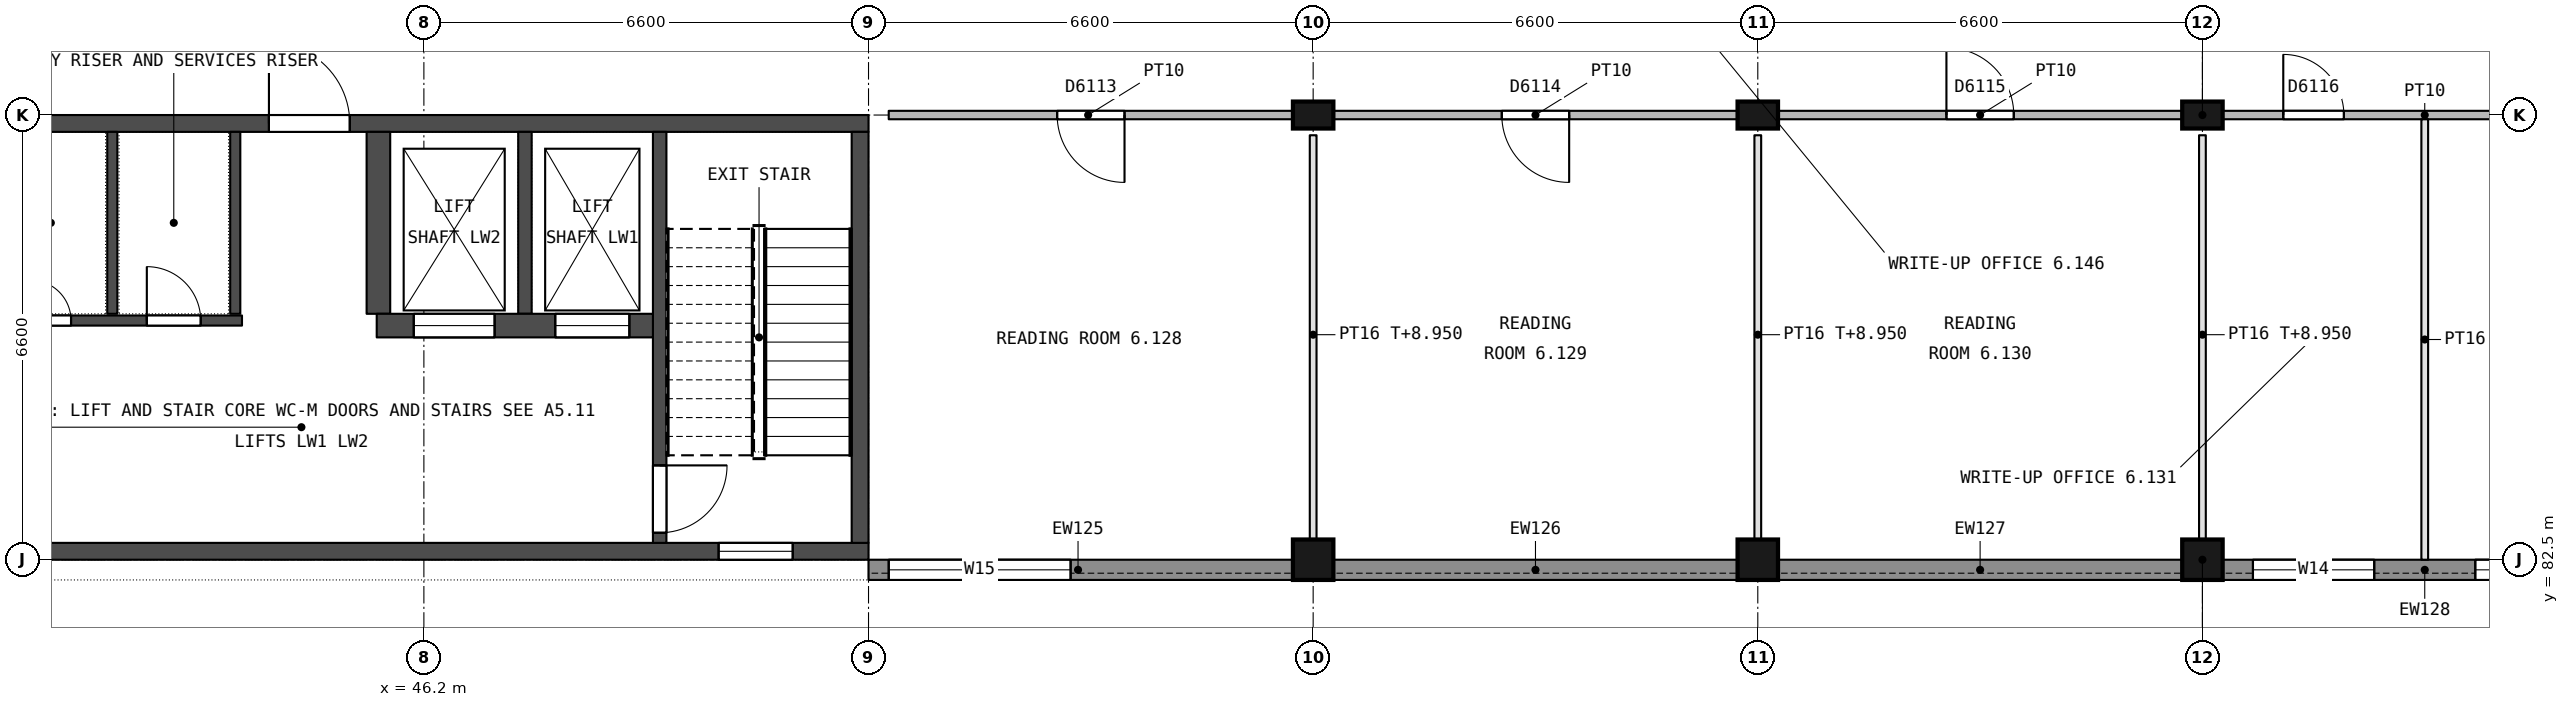
"""IFC4 building model, lengths in metres.
Left out: names, types, materials, properties, quantities, classifications, styles, units other than length and angle.
Written with IfcOpenShell. Run it as: python <this file> out.ifc"""

import sys

from ifc_helpers import new_model, si_unit, direction, frame, frame_2d, origin, origin_2d, place, context, subcontext, project, spatial, rectangle, extrude, element, fill, save


model = new_model("IFC4")
c1 = context("Model", 3, precision=1e-05, world=origin(), true_north=direction((0.0, 1.0)))
c2 = subcontext(c1, "Body", "Model", "MODEL_VIEW")
j1 = project(units=[si_unit("LENGTHUNIT", "METRE"), si_unit("PLANEANGLEUNIT", "RADIAN")], contexts=[c1])
p1 = place(None, origin())
s1 = spatial("IfcSite", under=j1, at=p1, CompositionType="ELEMENT")
p2 = place(p1, origin())
s2 = spatial("IfcBuilding", under=s1, at=p2, CompositionType="ELEMENT")
p3 = place(p2, frame((0.0, 0.0, 5.4)))
s3 = spatial("IfcBuildingStorey", under=s2, at=p3, CompositionType="ELEMENT", Elevation=5.4)
p4 = place(p3, frame((59.4, 82.5, 0.0), z_axis=(0.0, 0.0, 1.0), x_axis=(1.0, 0.0, 0.0)))
e1 = element("IfcColumn", 1, at=p4, inside=s3, PredefinedType="COLUMN", context=c2, shape_type="SweptSolid", body=[
    extrude(rectangle(XDim=0.6, YDim=0.6, at=origin_2d()), origin(), (0.0, 0.0, 1.0), 4.5),
])
p5 = place(p3, frame((59.4, 89.1, 0.0), z_axis=(0.0, 0.0, 1.0), x_axis=(1.0, 0.0, 0.0)))
e2 = element("IfcColumn", 2, at=p5, inside=s3, PredefinedType="COLUMN", context=c2, shape_type="SweptSolid", body=[
    extrude(rectangle(XDim=0.6, YDim=0.4, at=origin_2d()), origin(), (0.0, 0.0, 1.0), 4.5),
])
p6 = place(p3, frame((66.0, 82.5, 0.0), z_axis=(0.0, 0.0, 1.0), x_axis=(1.0, 0.0, 0.0)))
e3 = element("IfcColumn", 3, at=p6, inside=s3, PredefinedType="COLUMN", context=c2, shape_type="SweptSolid", body=[
    extrude(rectangle(XDim=0.6, YDim=0.6, at=origin_2d()), origin(), (0.0, 0.0, 1.0), 4.5),
])
p7 = place(p3, frame((66.0, 89.1, 0.0), z_axis=(0.0, 0.0, 1.0), x_axis=(1.0, 0.0, 0.0)))
e4 = element("IfcColumn", 4, at=p7, inside=s3, PredefinedType="COLUMN", context=c2, shape_type="SweptSolid", body=[
    extrude(rectangle(XDim=0.6, YDim=0.4, at=origin_2d()), origin(), (0.0, 0.0, 1.0), 4.5),
])
p8 = place(p3, frame((72.6, 82.5, 0.0), z_axis=(0.0, 0.0, 1.0), x_axis=(1.0, 0.0, 0.0)))
e5 = element("IfcColumn", 5, at=p8, inside=s3, PredefinedType="COLUMN", context=c2, shape_type="SweptSolid", body=[
    extrude(rectangle(XDim=0.6, YDim=0.6, at=origin_2d()), origin(), (0.0, 0.0, 1.0), 4.5),
])
p9 = place(p3, frame((72.6, 89.1, 0.0), z_axis=(0.0, 0.0, 1.0), x_axis=(1.0, 0.0, 0.0)))
e6 = element("IfcColumn", 6, at=p9, inside=s3, PredefinedType="COLUMN", context=c2, shape_type="SweptSolid", body=[
    extrude(rectangle(XDim=0.6, YDim=0.4, at=origin_2d()), origin(), (0.0, 0.0, 1.0), 4.5),
])
p10 = place(p3, frame((52.8, 88.975, 0.0), z_axis=(0.0, 0.0, 1.0), x_axis=(-1.0, 0.0, 0.0)))
e7 = element("IfcWall", 7, at=p10, inside=s3, PredefinedType="SHEAR", context=c2, shape_type="SweptSolid", body=[
    extrude(rectangle(XDim=13.2, YDim=0.25, at=frame_2d((6.6, 0.0))), origin(), (0.0, 0.0, 1.0), 4.25),
])
p11 = place(p10, frame((7.7, 0.0, 0.0)))
e8 = element("IfcOpeningElement", 8, at=p11, cuts=e7, PredefinedType="OPENING", context=c2, shape_type="SweptSolid", body=[
    extrude(rectangle(XDim=1.2, YDim=2.1, at=frame_2d((0.6, 1.05))), frame((0.0, 0.135, 0.0), z_axis=(0.0, -1.0, 0.0), x_axis=(1.0, 0.0, 0.0)), (0.0, 0.0, 1.0), 0.27),
])
p12 = place(p3, frame((52.8, 82.625, 0.0), z_axis=(0.0, 0.0, 1.0), x_axis=(-1.0, 0.0, 0.0)))
e9 = element("IfcWall", 9, at=p12, inside=s3, PredefinedType="SHEAR", context=c2, shape_type="SweptSolid", body=[
    extrude(rectangle(XDim=13.2, YDim=0.25, at=frame_2d((6.6, 0.0))), origin(), (0.0, 0.0, 1.0), 4.25),
])
p13 = place(p12, frame((1.125, 0.0, 0.7)))
e10 = element("IfcOpeningElement", 10, at=p13, cuts=e9, PredefinedType="OPENING", context=c2, shape_type="SweptSolid", body=[
    extrude(rectangle(XDim=1.1, YDim=1.5, at=frame_2d((0.55, 0.75))), frame((0.0, 0.135, 0.0), z_axis=(0.0, -1.0, 0.0), x_axis=(1.0, 0.0, 0.0)), (0.0, 0.0, 1.0), 0.27),
])
p14 = place(p3, frame((52.675, 88.85, 0.0), z_axis=(0.0, 0.0, 1.0), x_axis=(0.0, -1.0, 0.0)))
e11 = element("IfcWall", 11, at=p14, inside=s3, PredefinedType="SHEAR", context=c2, shape_type="SweptSolid", body=[
    extrude(rectangle(XDim=6.1, YDim=0.25, at=frame_2d((3.05, 0.0))), origin(), (0.0, 0.0, 1.0), 4.25),
])
p15 = place(p3, frame((49.7, 88.85, 0.0), z_axis=(0.0, 0.0, 1.0), x_axis=(0.0, -1.0, 0.0)))
e12 = element("IfcWall", 12, at=p15, inside=s3, PredefinedType="SHEAR", context=c2, shape_type="SweptSolid", body=[
    extrude(rectangle(XDim=6.1, YDim=0.2, at=frame_2d((3.05, 0.0))), origin(), (0.0, 0.0, 1.0), 4.25),
])
p16 = place(p15, frame((4.95, 0.0, 0.0)))
e13 = element("IfcOpeningElement", 13, at=p16, cuts=e12, PredefinedType="OPENING", context=c2, shape_type="SweptSolid", body=[
    extrude(rectangle(XDim=1.0, YDim=2.2, at=frame_2d((0.5, 1.1))), frame((0.0, 0.11, 0.0), z_axis=(0.0, -1.0, 0.0), x_axis=(1.0, 0.0, 0.0)), (0.0, 0.0, 1.0), 0.22),
])
p17 = place(p3, frame((47.7, 88.85, 0.0), z_axis=(0.0, 0.0, 1.0), x_axis=(0.0, -1.0, 0.0)))
e14 = element("IfcWall", 14, at=p17, inside=s3, PredefinedType="SHEAR", context=c2, shape_type="SweptSolid", body=[
    extrude(rectangle(XDim=2.7, YDim=0.2, at=frame_2d((1.35, 0.0))), origin(), (0.0, 0.0, 1.0), 4.25),
])
p18 = place(p3, frame((45.525, 88.85, 0.0), z_axis=(0.0, 0.0, 1.0), x_axis=(0.0, -1.0, 0.0)))
e15 = element("IfcWall", 15, at=p18, inside=s3, PredefinedType="SHEAR", context=c2, shape_type="SweptSolid", body=[
    extrude(rectangle(XDim=2.7, YDim=0.35, at=frame_2d((1.35, 0.0))), origin(), (0.0, 0.0, 1.0), 4.25),
])
p19 = place(p3, frame((49.6, 85.975, 0.0), z_axis=(0.0, 0.0, 1.0), x_axis=(-1.0, 0.0, 0.0)))
e16 = element("IfcWall", 16, at=p19, inside=s3, PredefinedType="SHEAR", context=c2, shape_type="SweptSolid", body=[
    extrude(rectangle(XDim=4.1, YDim=0.35, at=frame_2d((2.05, 0.0))), origin(), (0.0, 0.0, 1.0), 4.25),
])
p20 = place(p19, frame((0.35, 0.0, 0.0)))
e17 = element("IfcOpeningElement", 17, at=p20, cuts=e16, PredefinedType="OPENING", context=c2, shape_type="SweptSolid", body=[
    extrude(rectangle(XDim=1.1, YDim=2.2, at=frame_2d((0.55, 1.1))), frame((0.0, 0.185, 0.0), z_axis=(0.0, -1.0, 0.0), x_axis=(1.0, 0.0, 0.0)), (0.0, 0.0, 1.0), 0.37),
])
p21 = place(p19, frame((2.35, 0.0, 0.0)))
e18 = element("IfcOpeningElement", 18, at=p21, cuts=e16, PredefinedType="OPENING", context=c2, shape_type="SweptSolid", body=[
    extrude(rectangle(XDim=1.2, YDim=2.3, at=frame_2d((0.6, 1.15))), frame((0.0, 0.185, 0.0), z_axis=(0.0, -1.0, 0.0), x_axis=(1.0, 0.0, 0.0)), (0.0, 0.0, 1.0), 0.37),
])
p22 = place(p3, frame((43.4, 88.85, 0.0), z_axis=(0.0, 0.0, 1.0), x_axis=(0.0, -1.0, 0.0)))
e19 = element("IfcWall", 19, at=p22, inside=s3, PredefinedType="SHEAR", context=c2, shape_type="SweptSolid", body=[
    extrude(rectangle(XDim=2.7, YDim=0.15, at=frame_2d((1.35, 0.0))), origin(), (0.0, 0.0, 1.0), 4.25),
])
p23 = place(p3, frame((43.5, 86.05, 0.0), z_axis=(0.0, 0.0, 1.0), x_axis=(-1.0, 0.0, 0.0)))
e20 = element("IfcWall", 20, at=p23, inside=s3, PredefinedType="SHEAR", context=c2, shape_type="SweptSolid", body=[
    extrude(rectangle(XDim=3.65, YDim=0.15, at=frame_2d((1.825, 0.0))), origin(), (0.0, 0.0, 1.0), 4.25),
])
p24 = place(p23, frame((0.613, 0.0, 0.0)))
e21 = element("IfcOpeningElement", 21, at=p24, cuts=e20, PredefinedType="OPENING", context=c2, shape_type="SweptSolid", body=[
    extrude(rectangle(XDim=0.8, YDim=2.0, at=frame_2d((0.4, 1.0))), frame((0.0, 0.085, 0.0), z_axis=(0.0, -1.0, 0.0), x_axis=(1.0, 0.0, 0.0)), (0.0, 0.0, 1.0), 0.17),
])
p25 = place(p23, frame((2.538, 0.0, 0.0)))
e22 = element("IfcOpeningElement", 22, at=p25, cuts=e20, PredefinedType="OPENING", context=c2, shape_type="SweptSolid", body=[
    extrude(rectangle(XDim=0.6, YDim=2.1, at=frame_2d((0.3, 1.05))), frame((0.0, 0.085, 0.0), z_axis=(0.0, -1.0, 0.0), x_axis=(1.0, 0.0, 0.0)), (0.0, 0.0, 1.0), 0.17),
])
p26 = place(p3, frame((41.575, 88.85, 0.0), z_axis=(0.0, 0.0, 1.0), x_axis=(0.0, -1.0, 0.0)))
e23 = element("IfcWall", 23, at=p26, inside=s3, PredefinedType="SHEAR", context=c2, shape_type="SweptSolid", body=[
    extrude(rectangle(XDim=2.7, YDim=0.15, at=frame_2d((1.35, 0.0))), origin(), (0.0, 0.0, 1.0), 4.25),
])
p27 = place(p3, frame((59.1, 82.35, 0.0), z_axis=(0.0, 0.0, 1.0), x_axis=(-1.0, 0.0, 0.0)))
e24 = element("IfcWall", 24, at=p27, inside=s3, PredefinedType="STANDARD", context=c2, shape_type="SweptSolid", body=[
    extrude(rectangle(XDim=6.3, YDim=0.3, at=frame_2d((3.15, 0.0))), origin(), (0.0, 0.0, 1.0), 3.65),
])
p28 = place(p27, frame((3.3, 0.0, 0.6)))
e25 = element("IfcOpeningElement", 25, at=p28, cuts=e24, PredefinedType="OPENING", context=c2, shape_type="SweptSolid", body=[
    extrude(rectangle(XDim=2.7, YDim=2.1, at=frame_2d((1.35, 1.05))), frame((0.0, 0.16, 0.0), z_axis=(0.0, -1.0, 0.0), x_axis=(1.0, 0.0, 0.0)), (0.0, 0.0, 1.0), 0.32),
])
for number, where, z_axis, x_axis in (
    (26, (65.7, 82.35, 0.0), (0.0, 0.0, 1.0), (-1.0, 0.0, 0.0)),
    (27, (72.3, 82.35, 0.0), (0.0, 0.0, 1.0), (-1.0, 0.0, 0.0)),
):
    element("IfcWall", number, at=place(p3, frame(where, z_axis=z_axis, x_axis=x_axis)), inside=s3, PredefinedType="STANDARD", context=c2, shape_type="SweptSolid", body=[
        extrude(rectangle(XDim=6.0, YDim=0.3, at=frame_2d((3.0, 0.0))), origin(), (0.0, 0.0, 1.0), 3.65),
    ])
p29 = place(p3, frame((78.9, 82.35, 0.0), z_axis=(0.0, 0.0, 1.0), x_axis=(-1.0, 0.0, 0.0)))
e28 = element("IfcWall", 28, at=p29, inside=s3, PredefinedType="STANDARD", context=c2, shape_type="SweptSolid", body=[
    extrude(rectangle(XDim=6.0, YDim=0.3, at=frame_2d((3.0, 0.0))), origin(), (0.0, 0.0, 1.0), 3.65),
])
p30 = place(p29, frame((3.75, 0.0, 0.9)))
e29 = element("IfcOpeningElement", 29, at=p30, cuts=e28, PredefinedType="OPENING", context=c2, shape_type="SweptSolid", body=[
    extrude(rectangle(XDim=1.8, YDim=1.5, at=frame_2d((0.9, 0.75))), frame((0.0, 0.16, 0.0), z_axis=(0.0, -1.0, 0.0), x_axis=(1.0, 0.0, 0.0)), (0.0, 0.0, 1.0), 0.32),
])
p31 = place(p29, frame((0.45, 0.0, 0.9)))
e30 = element("IfcOpeningElement", 30, at=p31, cuts=e28, PredefinedType="OPENING", context=c2, shape_type="SweptSolid", body=[
    extrude(rectangle(XDim=1.8, YDim=1.5, at=frame_2d((0.9, 0.75))), frame((0.0, 0.16, 0.0), z_axis=(0.0, -1.0, 0.0), x_axis=(1.0, 0.0, 0.0)), (0.0, 0.0, 1.0), 0.32),
])
p32 = place(p3, frame((59.1, 89.1, 0.0), z_axis=(0.0, 0.0, 1.0), x_axis=(-1.0, 0.0, 0.0)))
e31 = element("IfcWall", 31, at=p32, inside=s3, PredefinedType="PARTITIONING", context=c2, shape_type="SweptSolid", body=[
    extrude(rectangle(XDim=6.0, YDim=0.125, at=frame_2d((3.0, 0.0))), origin(), (0.0, 0.0, 1.0), 3.65),
])
p33 = place(p32, frame((2.5, 0.0, 0.0)))
e32 = element("IfcOpeningElement", 32, at=p33, cuts=e31, PredefinedType="OPENING", context=c2, shape_type="SweptSolid", body=[
    extrude(rectangle(XDim=1.0, YDim=2.1, at=frame_2d((0.5, 1.05))), frame((0.0, 0.073, 0.0), z_axis=(0.0, -1.0, 0.0), x_axis=(1.0, 0.0, 0.0)), (0.0, 0.0, 1.0), 0.145),
])
p34 = place(p3, frame((65.7, 89.1, 0.0), z_axis=(0.0, 0.0, 1.0), x_axis=(-1.0, 0.0, 0.0)))
e33 = element("IfcWall", 33, at=p34, inside=s3, PredefinedType="PARTITIONING", context=c2, shape_type="SweptSolid", body=[
    extrude(rectangle(XDim=6.0, YDim=0.125, at=frame_2d((3.0, 0.0))), origin(), (0.0, 0.0, 1.0), 3.65),
])
p35 = place(p34, frame((2.5, 0.0, 0.0)))
e34 = element("IfcOpeningElement", 34, at=p35, cuts=e33, PredefinedType="OPENING", context=c2, shape_type="SweptSolid", body=[
    extrude(rectangle(XDim=1.0, YDim=2.1, at=frame_2d((0.5, 1.05))), frame((0.0, 0.073, 0.0), z_axis=(0.0, -1.0, 0.0), x_axis=(1.0, 0.0, 0.0)), (0.0, 0.0, 1.0), 0.145),
])
p36 = place(p3, frame((72.3, 89.1, 0.0), z_axis=(0.0, 0.0, 1.0), x_axis=(-1.0, 0.0, 0.0)))
e35 = element("IfcWall", 35, at=p36, inside=s3, PredefinedType="PARTITIONING", context=c2, shape_type="SweptSolid", body=[
    extrude(rectangle(XDim=6.0, YDim=0.125, at=frame_2d((3.0, 0.0))), origin(), (0.0, 0.0, 1.0), 3.65),
])
p37 = place(p36, frame((2.5, 0.0, 0.0)))
e36 = element("IfcOpeningElement", 36, at=p37, cuts=e35, PredefinedType="OPENING", context=c2, shape_type="SweptSolid", body=[
    extrude(rectangle(XDim=1.0, YDim=2.1, at=frame_2d((0.5, 1.05))), frame((0.0, 0.073, 0.0), z_axis=(0.0, -1.0, 0.0), x_axis=(1.0, 0.0, 0.0)), (0.0, 0.0, 1.0), 0.145),
])
p38 = place(p3, frame((78.9, 89.1, 0.0), z_axis=(0.0, 0.0, 1.0), x_axis=(-1.0, 0.0, 0.0)))
e37 = element("IfcWall", 37, at=p38, inside=s3, PredefinedType="PARTITIONING", context=c2, shape_type="SweptSolid", body=[
    extrude(rectangle(XDim=6.0, YDim=0.125, at=frame_2d((3.0, 0.0))), origin(), (0.0, 0.0, 1.0), 3.65),
])
p39 = place(p38, frame((4.2, 0.0, 0.0)))
e38 = element("IfcOpeningElement", 38, at=p39, cuts=e37, PredefinedType="OPENING", context=c2, shape_type="SweptSolid", body=[
    extrude(rectangle(XDim=0.9, YDim=2.1, at=frame_2d((0.45, 1.05))), frame((0.0, 0.073, 0.0), z_axis=(0.0, -1.0, 0.0), x_axis=(1.0, 0.0, 0.0)), (0.0, 0.0, 1.0), 0.145),
])
p40 = place(p38, frame((0.9, 0.0, 0.0)))
e39 = element("IfcOpeningElement", 39, at=p40, cuts=e37, PredefinedType="OPENING", context=c2, shape_type="SweptSolid", body=[
    extrude(rectangle(XDim=0.9, YDim=2.1, at=frame_2d((0.45, 1.05))), frame((0.0, 0.073, 0.0), z_axis=(0.0, -1.0, 0.0), x_axis=(1.0, 0.0, 0.0)), (0.0, 0.0, 1.0), 0.145),
])
for number, where, z_axis, x_axis in (
    (40, (59.4, 82.8, 0.0), (0.0, 0.0, 1.0), (0.0, 1.0, 0.0)),
    (41, (66.0, 82.8, 0.0), (0.0, 0.0, 1.0), (0.0, 1.0, 0.0)),
    (42, (72.6, 82.8, 0.0), (0.0, 0.0, 1.0), (0.0, 1.0, 0.0)),
):
    element("IfcWall", number, at=place(p3, frame(where, z_axis=z_axis, x_axis=x_axis)), inside=s3, PredefinedType="PARTITIONING", context=c2, shape_type="SweptSolid", body=[
        extrude(rectangle(XDim=6.0, YDim=0.1, at=frame_2d((3.0, 0.0))), origin(), (0.0, 0.0, 1.0), 3.55),
    ])
p41 = place(p3, frame((75.9, 82.5, 0.0), z_axis=(0.0, 0.0, 1.0), x_axis=(0.0, 1.0, 0.0)))
e43 = element("IfcWall", 43, at=p41, inside=s3, PredefinedType="PARTITIONING", context=c2, shape_type="SweptSolid", body=[
    extrude(rectangle(XDim=6.537, YDim=0.1, at=frame_2d((3.269, 0.0))), origin(), (0.0, 0.0, 1.0), 3.65),
])
p42 = place(p11, origin())
e44 = element("IfcDoor", 44, at=p42, inside=s3, OperationType="SINGLE_SWING_RIGHT", PredefinedType="DOOR", context=c2, shape_type="SweptSolid", body=[
    extrude(rectangle(XDim=1.2, YDim=2.1, at=frame_2d((0.6, 1.05))), frame((0.0, 0.025, 0.0), z_axis=(0.0, -1.0, 0.0), x_axis=(1.0, 0.0, 0.0)), (0.0, 0.0, 1.0), 0.05),
])
fill(e8, e44)
p43 = place(p24, origin())
e45 = element("IfcDoor", 45, at=p43, inside=s3, OperationType="SINGLE_SWING_RIGHT", PredefinedType="DOOR", context=c2, shape_type="SweptSolid", body=[
    extrude(rectangle(XDim=0.8, YDim=2.0, at=frame_2d((0.4, 1.0))), frame((0.0, 0.025, 0.0), z_axis=(0.0, -1.0, 0.0), x_axis=(1.0, 0.0, 0.0)), (0.0, 0.0, 1.0), 0.05),
])
fill(e21, e45)
p44 = place(p25, origin())
e46 = element("IfcDoor", 46, at=p44, inside=s3, OperationType="SINGLE_SWING_RIGHT", PredefinedType="DOOR", context=c2, shape_type="SweptSolid", body=[
    extrude(rectangle(XDim=0.6, YDim=2.1, at=frame_2d((0.3, 1.05))), frame((0.0, 0.025, 0.0), z_axis=(0.0, -1.0, 0.0), x_axis=(1.0, 0.0, 0.0)), (0.0, 0.0, 1.0), 0.05),
])
fill(e22, e46)
p45 = place(p16, origin())
e47 = element("IfcDoor", 47, at=p45, inside=s3, OperationType="SINGLE_SWING_LEFT", PredefinedType="DOOR", context=c2, shape_type="SweptSolid", body=[
    extrude(rectangle(XDim=1.0, YDim=2.2, at=frame_2d((0.5, 1.1))), frame((0.0, 0.025, 0.0), z_axis=(0.0, -1.0, 0.0), x_axis=(1.0, 0.0, 0.0)), (0.0, 0.0, 1.0), 0.05),
])
fill(e13, e47)
p46 = place(p20, origin())
e48 = element("IfcDoor", 48, at=p46, inside=s3, OperationType="DOUBLE_DOOR_SLIDING", PredefinedType="NOTDEFINED", context=c2, shape_type="SweptSolid", body=[
    extrude(rectangle(XDim=1.1, YDim=2.2, at=frame_2d((0.55, 1.1))), frame((0.0, 0.025, 0.0), z_axis=(0.0, -1.0, 0.0), x_axis=(1.0, 0.0, 0.0)), (0.0, 0.0, 1.0), 0.05),
])
fill(e17, e48)
p47 = place(p21, origin())
e49 = element("IfcDoor", 49, at=p47, inside=s3, OperationType="DOUBLE_DOOR_SLIDING", PredefinedType="NOTDEFINED", context=c2, shape_type="SweptSolid", body=[
    extrude(rectangle(XDim=1.2, YDim=2.3, at=frame_2d((0.6, 1.15))), frame((0.0, 0.025, 0.0), z_axis=(0.0, -1.0, 0.0), x_axis=(1.0, 0.0, 0.0)), (0.0, 0.0, 1.0), 0.05),
])
fill(e18, e49)
p48 = place(p13, origin())
e50 = element("IfcWindow", 50, at=p48, inside=s3, PartitioningType="SINGLE_PANEL", PredefinedType="WINDOW", context=c2, shape_type="SweptSolid", body=[
    extrude(rectangle(XDim=1.1, YDim=1.5, at=frame_2d((0.55, 0.75))), frame((0.0, 0.03, 0.0), z_axis=(0.0, -1.0, 0.0), x_axis=(1.0, 0.0, 0.0)), (0.0, 0.0, 1.0), 0.06),
])
fill(e10, e50)
p49 = place(p28, origin())
e51 = element("IfcWindow", 51, at=p49, inside=s3, PartitioningType="SINGLE_PANEL", PredefinedType="WINDOW", context=c2, shape_type="SweptSolid", body=[
    extrude(rectangle(XDim=2.7, YDim=2.1, at=frame_2d((1.35, 1.05))), frame((0.0, 0.03, 0.0), z_axis=(0.0, -1.0, 0.0), x_axis=(1.0, 0.0, 0.0)), (0.0, 0.0, 1.0), 0.06),
])
fill(e25, e51)
p50 = place(p30, origin())
e52 = element("IfcWindow", 52, at=p50, inside=s3, PartitioningType="SINGLE_PANEL", PredefinedType="WINDOW", context=c2, shape_type="SweptSolid", body=[
    extrude(rectangle(XDim=1.8, YDim=1.5, at=frame_2d((0.9, 0.75))), frame((0.0, 0.03, 0.0), z_axis=(0.0, -1.0, 0.0), x_axis=(1.0, 0.0, 0.0)), (0.0, 0.0, 1.0), 0.06),
])
fill(e29, e52)
p51 = place(p31, origin())
e53 = element("IfcWindow", 53, at=p51, inside=s3, PartitioningType="SINGLE_PANEL", PredefinedType="WINDOW", context=c2, shape_type="SweptSolid", body=[
    extrude(rectangle(XDim=1.8, YDim=1.5, at=frame_2d((0.9, 0.75))), frame((0.0, 0.03, 0.0), z_axis=(0.0, -1.0, 0.0), x_axis=(1.0, 0.0, 0.0)), (0.0, 0.0, 1.0), 0.06),
])
fill(e30, e53)
p52 = place(p33, origin())
e54 = element("IfcDoor", 54, at=p52, inside=s3, OperationType="SINGLE_SWING_LEFT", PredefinedType="DOOR", context=c2, shape_type="SweptSolid", body=[
    extrude(rectangle(XDim=1.0, YDim=2.1, at=frame_2d((0.5, 1.05))), frame((0.0, 0.025, 0.0), z_axis=(0.0, -1.0, 0.0), x_axis=(1.0, 0.0, 0.0)), (0.0, 0.0, 1.0), 0.05),
])
fill(e32, e54)
p53 = place(p35, origin())
e55 = element("IfcDoor", 55, at=p53, inside=s3, OperationType="SINGLE_SWING_LEFT", PredefinedType="DOOR", context=c2, shape_type="SweptSolid", body=[
    extrude(rectangle(XDim=1.0, YDim=2.1, at=frame_2d((0.5, 1.05))), frame((0.0, 0.025, 0.0), z_axis=(0.0, -1.0, 0.0), x_axis=(1.0, 0.0, 0.0)), (0.0, 0.0, 1.0), 0.05),
])
fill(e34, e55)
p54 = place(p37, origin())
e56 = element("IfcDoor", 56, at=p54, inside=s3, OperationType="SINGLE_SWING_RIGHT", PredefinedType="DOOR", context=c2, shape_type="SweptSolid", body=[
    extrude(rectangle(XDim=1.0, YDim=2.1, at=frame_2d((0.5, 1.05))), frame((0.0, 0.025, 0.0), z_axis=(0.0, -1.0, 0.0), x_axis=(1.0, 0.0, 0.0)), (0.0, 0.0, 1.0), 0.05),
])
fill(e36, e56)
p55 = place(p39, origin())
e57 = element("IfcDoor", 57, at=p55, inside=s3, OperationType="SINGLE_SWING_RIGHT", PredefinedType="DOOR", context=c2, shape_type="SweptSolid", body=[
    extrude(rectangle(XDim=0.9, YDim=2.1, at=frame_2d((0.45, 1.05))), frame((0.0, 0.025, 0.0), z_axis=(0.0, -1.0, 0.0), x_axis=(1.0, 0.0, 0.0)), (0.0, 0.0, 1.0), 0.05),
])
fill(e38, e57)
save(model, sys.argv[1])
